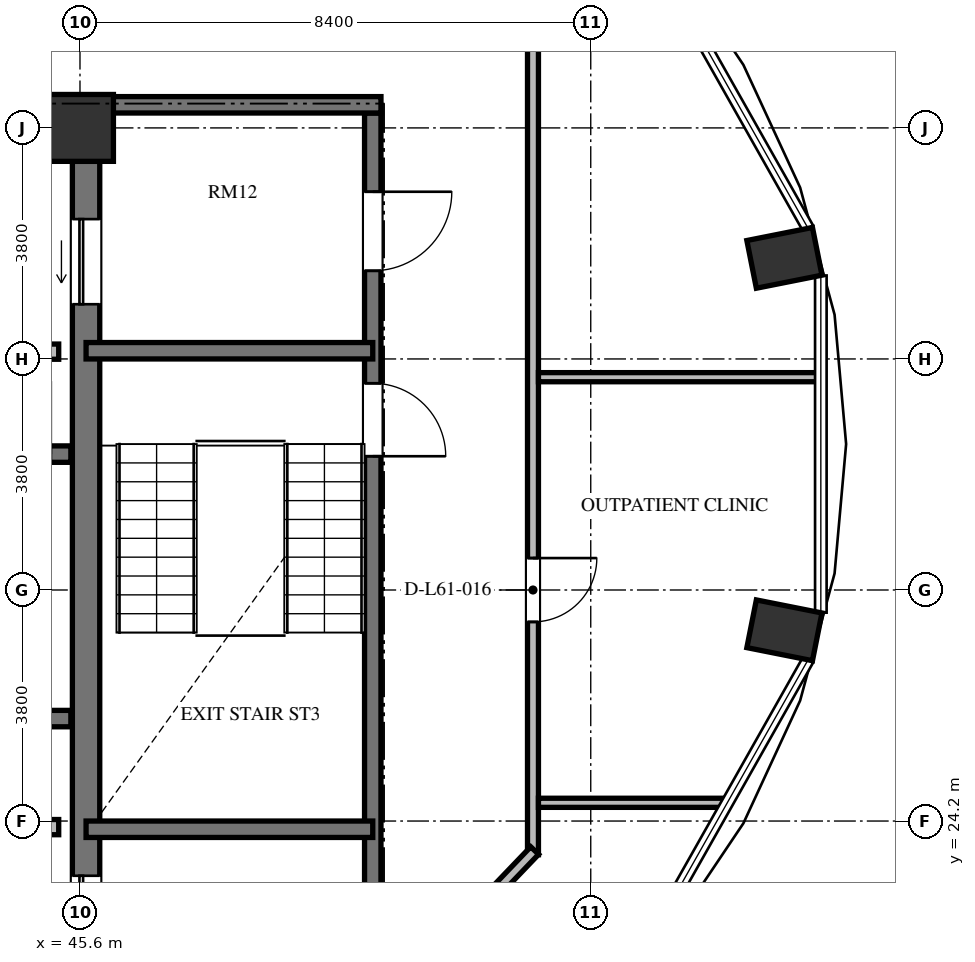
"""IFC4 building model, lengths in metres.
Left out: names, types, materials, properties, quantities, classifications, styles, units other than length and angle.
Written with IfcOpenShell. Run it as: python <this file> out.ifc"""

import sys

from ifc_helpers import new_model, si_unit, direction, frame, frame_2d, origin, origin_2d, place, context, subcontext, project, spatial, rectangle, extrude, element, fill, save


model = new_model("IFC4")
c1 = context("Model", 3, precision=1e-05, world=origin(), true_north=direction((0.0, 1.0)))
c2 = subcontext(c1, "Body", "Model", "MODEL_VIEW")
j1 = project(units=[si_unit("LENGTHUNIT", "METRE"), si_unit("PLANEANGLEUNIT", "RADIAN")], contexts=[c1])
p1 = place(None, origin())
s1 = spatial("IfcSite", under=j1, at=p1, CompositionType="ELEMENT")
p2 = place(p1, origin())
s2 = spatial("IfcBuilding", under=s1, at=p2, CompositionType="ELEMENT")
p3 = place(p2, frame((0.0, 0.0, 234.96)))
s3 = spatial("IfcBuildingStorey", under=s2, at=p3, CompositionType="ELEMENT", Elevation=234.96)
for number, where, z_axis, x_axis in (
    (1, (57.185, 27.337, 0.0), (0.0, 0.0, 1.0), (0.981, -0.195, 0.0)),
    (2, (57.185, 33.463, 0.0), (0.0, 0.0, 1.0), (0.981, 0.195, 0.0)),
):
    element("IfcColumn", number, at=place(p3, frame(where, z_axis=z_axis, x_axis=x_axis)), inside=s3, PredefinedType="COLUMN", context=c2, shape_type="SweptSolid", body=[
        extrude(rectangle(XDim=1.1, YDim=0.8, at=origin_2d()), origin(), (0.0, 0.0, 1.0), 3.648),
    ])
p4 = place(p3, frame((45.6, 35.6, 0.0), z_axis=(0.0, 0.0, 1.0), x_axis=(1.0, 0.0, 0.0)))
e3 = element("IfcColumn", 3, at=p4, inside=s3, PredefinedType="COLUMN", context=c2, shape_type="SweptSolid", body=[
    extrude(rectangle(XDim=1.1, YDim=1.1, at=origin_2d()), origin(), (0.0, 0.0, 1.0), 3.648),
])
p5 = place(p3, frame((45.7, 20.95, 0.0), z_axis=(0.0, 0.0, 1.0), x_axis=(0.0, 1.0, 0.0)))
e4 = element("IfcWall", 4, at=p5, inside=s3, PredefinedType="SHEAR", context=c2, shape_type="SweptSolid", body=[
    extrude(rectangle(XDim=14.1, YDim=0.45, at=frame_2d((7.05, 0.0))), origin(), (0.0, 0.0, 1.0), 3.648),
])
p6 = place(p5, frame((11.75, 0.0, 0.0)))
e5 = element("IfcOpeningElement", 5, at=p6, cuts=e4, PredefinedType="OPENING", context=c2, shape_type="SweptSolid", body=[
    extrude(rectangle(XDim=1.4, YDim=2.3, at=frame_2d((0.7, 1.15))), frame((0.0, 0.235, 0.0), z_axis=(0.0, -1.0, 0.0), x_axis=(1.0, 0.0, 0.0)), (0.0, 0.0, 1.0), 0.47),
])
p7 = place(p5, frame((0.95, 0.0, 0.0)))
e6 = element("IfcOpeningElement", 6, at=p7, cuts=e4, PredefinedType="OPENING", context=c2, shape_type="SweptSolid", body=[
    extrude(rectangle(XDim=1.4, YDim=2.3, at=frame_2d((0.7, 1.15))), frame((0.0, 0.235, 0.0), z_axis=(0.0, -1.0, 0.0), x_axis=(1.0, 0.0, 0.0)), (0.0, 0.0, 1.0), 0.47),
])
p8 = place(p3, frame((37.465, 30.235, 0.0), z_axis=(0.0, 0.0, 1.0), x_axis=(1.0, 0.0, 0.0)))
e7 = element("IfcWall", 7, at=p8, inside=s3, PredefinedType="SHEAR", context=c2, shape_type="SweptSolid", body=[
    extrude(rectangle(XDim=7.985, YDim=0.27, at=frame_2d((3.992, 0.0))), origin(), (0.0, 0.0, 1.0), 3.648),
])
p9 = place(p8, frame((6.455, 0.0, 0.0)))
e8 = element("IfcOpeningElement", 8, at=p9, cuts=e7, PredefinedType="OPENING", context=c2, shape_type="SweptSolid", body=[
    extrude(rectangle(XDim=1.2, YDim=2.15, at=frame_2d((0.6, 1.075))), frame((0.0, 0.145, 0.0), z_axis=(0.0, -1.0, 0.0), x_axis=(1.0, 0.0, 0.0)), (0.0, 0.0, 1.0), 0.29),
])
p10 = place(p3, frame((37.465, 25.885, 0.0), z_axis=(0.0, 0.0, 1.0), x_axis=(1.0, 0.0, 0.0)))
e9 = element("IfcWall", 9, at=p10, inside=s3, PredefinedType="SHEAR", context=c2, shape_type="SweptSolid", body=[
    extrude(rectangle(XDim=7.985, YDim=0.27, at=frame_2d((3.992, 0.0))), origin(), (0.0, 0.0, 1.0), 3.648),
])
for number, where, z_axis, x_axis in (
    (10, (42.95, 31.92, 0.0), (0.0, 0.0, 1.0), (1.0, 0.0, 0.0)),
    (11, (42.95, 24.1, 0.0), (0.0, 0.0, 1.0), (1.0, 0.0, 0.0)),
):
    element("IfcWall", number, at=place(p3, frame(where, z_axis=z_axis, x_axis=x_axis)), inside=s3, PredefinedType="SOLIDWALL", context=c2, shape_type="SweptSolid", body=[
        extrude(rectangle(XDim=2.3, YDim=0.25, at=frame_2d((1.15, 0.0))), origin(), (0.0, 0.0, 1.0), 3.448),
    ])
p11 = place(p3, frame((50.415, 35.845, 0.0), z_axis=(0.0, 0.0, 1.0), x_axis=(0.0, -1.0, 0.0)))
e12 = element("IfcWall", 12, at=p11, inside=s3, PredefinedType="SHEAR", context=c2, shape_type="SweptSolid", body=[
    extrude(rectangle(XDim=15.825, YDim=0.27, at=frame_2d((7.913, 0.0))), origin(), (0.0, 0.0, 1.0), 3.648),
])
p12 = place(p11, frame((4.445, 0.0, 0.0)))
e13 = element("IfcOpeningElement", 13, at=p12, cuts=e12, PredefinedType="OPENING", context=c2, shape_type="SweptSolid", body=[
    extrude(rectangle(XDim=1.2, YDim=2.15, at=frame_2d((0.6, 1.075))), frame((0.0, 0.145, 0.0), z_axis=(0.0, -1.0, 0.0), x_axis=(1.0, 0.0, 0.0)), (0.0, 0.0, 1.0), 0.29),
])
p13 = place(p11, frame((1.295, 0.0, 0.0)))
e14 = element("IfcOpeningElement", 14, at=p13, cuts=e12, PredefinedType="OPENING", context=c2, shape_type="SweptSolid", body=[
    extrude(rectangle(XDim=1.3, YDim=2.2, at=frame_2d((0.65, 1.1))), frame((0.0, 0.145, 0.0), z_axis=(0.0, -1.0, 0.0), x_axis=(1.0, 0.0, 0.0)), (0.0, 0.0, 1.0), 0.29),
])
p14 = place(p11, frame((13.095, 0.0, 0.0)))
e15 = element("IfcOpeningElement", 15, at=p14, cuts=e12, PredefinedType="OPENING", context=c2, shape_type="SweptSolid", body=[
    extrude(rectangle(XDim=1.3, YDim=2.2, at=frame_2d((0.65, 1.1))), frame((0.0, 0.145, 0.0), z_axis=(0.0, -1.0, 0.0), x_axis=(1.0, 0.0, 0.0)), (0.0, 0.0, 1.0), 0.29),
])
p15 = place(p3, frame((45.925, 35.98, 0.0), z_axis=(0.0, 0.0, 1.0), x_axis=(1.0, 0.0, 0.0)))
e16 = element("IfcWall", 16, at=p15, inside=s3, PredefinedType="SHEAR", context=c2, shape_type="SweptSolid", body=[
    extrude(rectangle(XDim=4.625, YDim=0.27, at=frame_2d((2.312, 0.0))), origin(), (0.0, 0.0, 1.0), 3.648),
])
for number, where, z_axis, x_axis in (
    (17, (45.7, 31.935, 0.0), (0.0, 0.0, 1.0), (1.0, 0.0, 0.0)),
    (18, (45.7, 24.065, 0.0), (0.0, 0.0, 1.0), (1.0, 0.0, 0.0)),
):
    element("IfcWall", number, at=place(p3, frame(where, z_axis=z_axis, x_axis=x_axis)), inside=s3, PredefinedType="SHEAR", context=c2, shape_type="SweptSolid", body=[
        extrude(rectangle(XDim=4.715, YDim=0.27, at=frame_2d((2.357, 0.0))), origin(), (0.0, 0.0, 1.0), 3.648),
    ])
p16 = place(p3, frame((53.05, 37.155, 0.0), z_axis=(0.0, 0.0, 1.0), x_axis=(0.0, -1.0, 0.0)))
e19 = element("IfcWall", 19, at=p16, inside=s3, PredefinedType="PARTITIONING", context=c2, shape_type="SweptSolid", body=[
    extrude(rectangle(XDim=13.509, YDim=0.18, at=frame_2d((6.754, 0.0))), origin(), (0.0, 0.0, 1.0), 3.448),
])
p17 = place(p16, frame((8.629, 0.0, 0.0)))
e20 = element("IfcOpeningElement", 20, at=p17, cuts=e19, PredefinedType="OPENING", context=c2, shape_type="SweptSolid", body=[
    extrude(rectangle(XDim=1.05, YDim=2.15, at=frame_2d((0.525, 1.075))), frame((0.0, 0.1, 0.0), z_axis=(0.0, -1.0, 0.0), x_axis=(1.0, 0.0, 0.0)), (0.0, 0.0, 1.0), 0.2),
])
p18 = place(p3, frame((53.078, 23.714, 0.0), z_axis=(0.0, 0.0, 1.0), x_axis=(-0.691353379446, -0.722516785085, 0.0)))
e21 = element("IfcWall", 21, at=p18, inside=s3, PredefinedType="PARTITIONING", context=c2, shape_type="SweptSolid", body=[
    extrude(rectangle(XDim=3.604, YDim=0.18, at=frame_2d((1.802, 0.0))), origin(), (0.0, 0.0, 1.0), 3.448),
])
p19 = place(p3, frame((53.14, 24.5, 0.0), z_axis=(0.0, 0.0, 1.0), x_axis=(1.0, 0.0, 0.0)))
e22 = element("IfcWall", 22, at=p19, inside=s3, PredefinedType="PARTITIONING", context=c2, shape_type="SweptSolid", body=[
    extrude(rectangle(XDim=3.095, YDim=0.15, at=frame_2d((1.548, 0.0))), origin(), (0.0, 0.0, 1.0), 3.448),
])
p20 = place(p3, frame((53.14, 31.5, 0.0), z_axis=(0.0, 0.0, 1.0), x_axis=(1.0, 0.0, 0.0)))
e23 = element("IfcWall", 23, at=p20, inside=s3, PredefinedType="PARTITIONING", context=c2, shape_type="SweptSolid", body=[
    extrude(rectangle(XDim=4.632, YDim=0.15, at=frame_2d((2.316, 0.0))), origin(), (0.0, 0.0, 1.0), 3.448),
])
p21 = place(p6, origin())
e24 = element("IfcDoor", 24, at=p21, inside=s3, OperationType="SLIDING_TO_LEFT", PredefinedType="DOOR", context=c2, shape_type="SweptSolid", body=[
    extrude(rectangle(XDim=1.4, YDim=2.3, at=frame_2d((0.7, 1.15))), frame((0.0, 0.025, 0.0), z_axis=(0.0, -1.0, 0.0), x_axis=(1.0, 0.0, 0.0)), (0.0, 0.0, 1.0), 0.05),
])
fill(e5, e24)
p22 = place(p7, origin())
e25 = element("IfcDoor", 25, at=p22, inside=s3, OperationType="SLIDING_TO_LEFT", PredefinedType="DOOR", context=c2, shape_type="SweptSolid", body=[
    extrude(rectangle(XDim=1.4, YDim=2.3, at=frame_2d((0.7, 1.15))), frame((0.0, 0.025, 0.0), z_axis=(0.0, -1.0, 0.0), x_axis=(1.0, 0.0, 0.0)), (0.0, 0.0, 1.0), 0.05),
])
fill(e6, e25)
p23 = place(p12, origin())
e26 = element("IfcDoor", 26, at=p23, inside=s3, OperationType="SINGLE_SWING_RIGHT", PredefinedType="DOOR", context=c2, shape_type="SweptSolid", body=[
    extrude(rectangle(XDim=1.2, YDim=2.15, at=frame_2d((0.6, 1.075))), frame((0.0, 0.025, 0.0), z_axis=(0.0, -1.0, 0.0), x_axis=(1.0, 0.0, 0.0)), (0.0, 0.0, 1.0), 0.05),
])
fill(e13, e26)
p24 = place(p13, origin())
e27 = element("IfcDoor", 27, at=p24, inside=s3, OperationType="SINGLE_SWING_LEFT", PredefinedType="DOOR", context=c2, shape_type="SweptSolid", body=[
    extrude(rectangle(XDim=1.3, YDim=2.2, at=frame_2d((0.65, 1.1))), frame((0.0, 0.025, 0.0), z_axis=(0.0, -1.0, 0.0), x_axis=(1.0, 0.0, 0.0)), (0.0, 0.0, 1.0), 0.05),
])
fill(e14, e27)
p25 = place(p17, origin())
e28 = element("IfcDoor", 28, at=p25, inside=s3, OperationType="SINGLE_SWING_LEFT", PredefinedType="DOOR", context=c2, shape_type="SweptSolid", body=[
    extrude(rectangle(XDim=1.05, YDim=2.15, at=frame_2d((0.525, 1.075))), frame((0.0, 0.025, 0.0), z_axis=(0.0, -1.0, 0.0), x_axis=(1.0, 0.0, 0.0)), (0.0, 0.0, 1.0), 0.05),
])
fill(e20, e28)
save(model, sys.argv[1])
